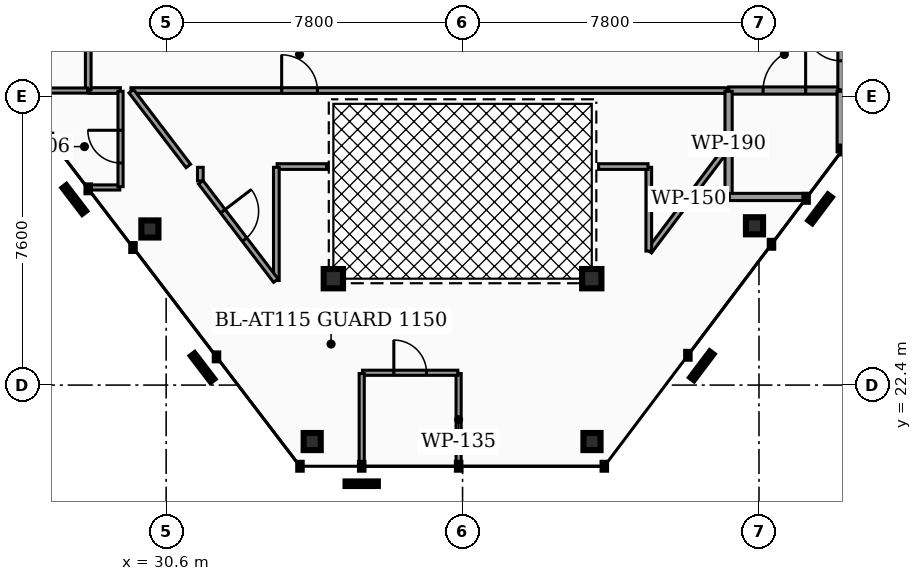
"""IFC4 building model, lengths in metres.
Left out: names, types, materials, properties, quantities, classifications, styles, units other than length and angle.
Written with IfcOpenShell. Run it as: python <this file> out.ifc"""

import sys

from ifc_helpers import new_model, si_unit, direction, frame, frame_2d, origin, origin_2d, place, context, subcontext, project, spatial, rectangle, hollow_rectangle, hollow_circle, extrude, element, fill, save


model = new_model("IFC4")
c1 = context("Model", 3, precision=1e-05, world=origin(), true_north=direction((0.0, 1.0)))
c2 = subcontext(c1, "Body", "Model", "MODEL_VIEW")
j1 = project(units=[si_unit("LENGTHUNIT", "METRE"), si_unit("PLANEANGLEUNIT", "RADIAN")], contexts=[c1])
p1 = place(None, origin())
s1 = spatial("IfcSite", under=j1, at=p1, CompositionType="ELEMENT")
p2 = place(p1, origin())
s2 = spatial("IfcBuilding", under=s1, at=p2, CompositionType="ELEMENT")
p3 = place(p2, frame((0.0, 0.0, 295.8)))
s3 = spatial("IfcBuildingStorey", under=s2, at=p3, CompositionType="ELEMENT", Elevation=295.8)
p4 = place(p3, frame((30.173, 26.508, 0.0), z_axis=(0.066891384466, 0.132340162457, 0.988944702238), x_axis=(-0.892473001286, 0.451100811321, 0.0)))
e1 = element("IfcColumn", 1, at=p4, inside=s3, PredefinedType="COLUMN", context=c2, shape_type="SweptSolid", body=[
    extrude(hollow_rectangle(XDim=0.45, YDim=0.45, WallThickness=0.022, at=origin_2d()), origin(), (0.0, 0.0, 1.0), 3.216),
])
p5 = place(p3, frame((34.443, 20.914, 0.0), z_axis=(0.062642789839, 0.142576809804, 0.987799440265), x_axis=(-0.915530323454, 0.402248961262, 0.0)))
e2 = element("IfcColumn", 2, at=p5, inside=s3, PredefinedType="COLUMN", context=c2, shape_type="SweptSolid", body=[
    extrude(hollow_rectangle(XDim=0.45, YDim=0.45, WallThickness=0.022, at=origin_2d()), origin(), (0.0, 0.0, 1.0), 3.219),
])
p6 = place(p3, frame((41.806, 20.914, 0.0), z_axis=(-0.118089079314, 0.141857807738, 0.98281805627), x_axis=(-0.768556261675, -0.639782207192, 0.0)))
e3 = element("IfcColumn", 3, at=p6, inside=s3, PredefinedType="COLUMN", context=c2, shape_type="SweptSolid", body=[
    extrude(hollow_rectangle(XDim=0.45, YDim=0.45, WallThickness=0.022, at=origin_2d()), origin(), (0.0, 0.0, 1.0), 3.236),
])
p7 = place(p3, frame((46.082, 26.592, 0.0), z_axis=(-0.130108825885, 0.129656010946, 0.982985764013), x_axis=(-0.705873099589, -0.708338314139, 0.0)))
e4 = element("IfcColumn", 4, at=p7, inside=s3, PredefinedType="COLUMN", context=c2, shape_type="SweptSolid", body=[
    extrude(hollow_rectangle(XDim=0.45, YDim=0.45, WallThickness=0.022, at=origin_2d()), origin(), (0.0, 0.0, 1.0), 3.235),
])
for number, where, z_axis, x_axis in (
    (5, (35.0, 25.2, 0.0), (0.0, 0.0, 1.0), (1.0, 0.0, 0.0)),
    (6, (41.8, 25.2, 0.0), (0.0, 0.0, 1.0), (1.0, 0.0, 0.0)),
):
    element("IfcColumn", number, at=place(p3, frame(where, z_axis=z_axis, x_axis=x_axis)), inside=s3, PredefinedType="COLUMN", context=c2, shape_type="SweptSolid", body=[
        extrude(hollow_circle(Radius=0.254, WallThickness=0.02, at=origin_2d()), origin(), (0.0, 0.0, 1.0), 3.18),
    ])
p8 = place(p3, frame((45.405, 30.15, 0.0), z_axis=(0.0, 0.0, 1.0), x_axis=(1.0, 0.0, 0.0)))
e7 = element("IfcWall", 7, at=p8, inside=s3, PredefinedType="PARTITIONING", context=c2, shape_type="SweptSolid", body=[
    extrude(rectangle(XDim=2.925, YDim=0.19, at=frame_2d((1.462, 0.0))), origin(), (0.0, 0.0, 1.0), 2.235),
])
p9 = place(p8, frame((0.903, 0.0, 0.0)))
e8 = element("IfcOpeningElement", 8, at=p9, cuts=e7, PredefinedType="OPENING", context=c2, shape_type="SweptSolid", body=[
    extrude(rectangle(XDim=1.12, YDim=2.05, at=frame_2d((0.56, 1.025))), frame((0.0, 0.105, 0.0), z_axis=(0.0, -1.0, 0.0), x_axis=(1.0, 0.0, 0.0)), (0.0, 0.0, 1.0), 0.21),
])
p10 = place(p3, frame((29.675, 30.15, 0.0), z_axis=(0.0, 0.0, 1.0), x_axis=(1.0, 0.0, 0.0)))
e9 = element("IfcWall", 9, at=p10, inside=s3, PredefinedType="PARTITIONING", context=c2, shape_type="SweptSolid", body=[
    extrude(rectangle(XDim=15.67, YDim=0.15, at=frame_2d((7.835, 0.0))), origin(), (0.0, 0.0, 1.0), 2.235),
])
p11 = place(p10, frame((3.965, 0.0, 0.0)))
e10 = element("IfcOpeningElement", 10, at=p11, cuts=e9, PredefinedType="OPENING", context=c2, shape_type="SweptSolid", body=[
    extrude(rectangle(XDim=0.94, YDim=2.05, at=frame_2d((0.47, 1.025))), frame((0.0, 0.085, 0.0), z_axis=(0.0, -1.0, 0.0), x_axis=(1.0, 0.0, 0.0)), (0.0, 0.0, 1.0), 0.17),
])
p12 = place(p3, frame((28.57, 30.15, 0.0), z_axis=(0.0, 0.0, 1.0), x_axis=(1.0, 0.0, 0.0)))
e11 = element("IfcWall", 11, at=p12, inside=s3, PredefinedType="PARTITIONING", context=c2, shape_type="SweptSolid", body=[
    extrude(rectangle(XDim=0.825, YDim=0.15, at=frame_2d((0.413, 0.0))), origin(), (0.0, 0.0, 1.0), 2.235),
])
p13 = place(p3, frame((28.55, 30.17, 0.0), z_axis=(0.0, 0.0, 1.0), x_axis=(0.0, 1.0, 0.0)))
e12 = element("IfcWall", 12, at=p13, inside=s3, PredefinedType="PARTITIONING", context=c2, shape_type="SweptSolid", body=[
    extrude(rectangle(XDim=1.471, YDim=0.15, at=frame_2d((0.736, 0.0))), origin(), (0.0, 0.0, 1.0), 2.235),
])
p14 = place(p3, frame((48.35, 30.17, 0.0), z_axis=(0.0, 0.0, 1.0), x_axis=(0.0, 1.0, 0.0)))
e13 = element("IfcWall", 13, at=p14, inside=s3, PredefinedType="PARTITIONING", context=c2, shape_type="SweptSolid", body=[
    extrude(rectangle(XDim=2.465, YDim=0.15, at=frame_2d((1.233, 0.0))), origin(), (0.0, 0.0, 1.0), 2.235),
])
p15 = place(p14, frame((0.763, 0.0, 0.0)))
e14 = element("IfcOpeningElement", 14, at=p15, cuts=e13, PredefinedType="OPENING", context=c2, shape_type="SweptSolid", body=[
    extrude(rectangle(XDim=0.94, YDim=2.05, at=frame_2d((0.47, 1.025))), frame((0.0, 0.085, 0.0), z_axis=(0.0, -1.0, 0.0), x_axis=(1.0, 0.0, 0.0)), (0.0, 0.0, 1.0), 0.17),
])
p16 = place(p3, frame((45.4, 27.37, 0.0), z_axis=(0.0, 0.0, 1.0), x_axis=(0.0, 1.0, 0.0)))
e15 = element("IfcWall", 15, at=p16, inside=s3, PredefinedType="PARTITIONING", context=c2, shape_type="SweptSolid", body=[
    extrude(rectangle(XDim=2.76, YDim=0.19, at=frame_2d((1.38, 0.0))), origin(), (0.0, 0.0, 1.0), 2.235),
])
p17 = place(p3, frame((45.42, 27.35, 0.0), z_axis=(0.0, 0.0, 1.0), x_axis=(1.0, 0.0, 0.0)))
e16 = element("IfcWall", 16, at=p17, inside=s3, PredefinedType="PARTITIONING", context=c2, shape_type="SweptSolid", body=[
    extrude(rectangle(XDim=2.032, YDim=0.19, at=frame_2d((1.016, 0.0))), origin(), (0.0, 0.0, 1.0), 2.235),
])
p18 = place(p3, frame((48.35, 28.537, 0.0), z_axis=(0.0, 0.0, 1.0), x_axis=(0.0, 1.0, 0.0)))
e17 = element("IfcWall", 17, at=p18, inside=s3, PredefinedType="PARTITIONING", context=c2, shape_type="SweptSolid", body=[
    extrude(rectangle(XDim=1.593, YDim=0.19, at=frame_2d((0.797, 0.0))), origin(), (0.0, 0.0, 1.0), 2.235),
])
p19 = place(p3, frame((43.312, 25.922, 0.0), z_axis=(0.0, 0.0, 1.0), x_axis=(0.60171699977, 0.798709366533, 0.0)))
e18 = element("IfcWall", 18, at=p19, inside=s3, PredefinedType="PARTITIONING", context=c2, shape_type="SweptSolid", body=[
    extrude(rectangle(XDim=3.455, YDim=0.15, at=frame_2d((1.728, 0.0))), origin(), (0.0, 0.0, 1.0), 2.235),
])
p20 = place(p3, frame((43.3, 25.926, 0.0), z_axis=(0.0, 0.0, 1.0), x_axis=(0.0, 1.0, 0.0)))
e19 = element("IfcWall", 19, at=p20, inside=s3, PredefinedType="PARTITIONING", context=c2, shape_type="SweptSolid", body=[
    extrude(rectangle(XDim=2.204, YDim=0.15, at=frame_2d((1.102, 0.0))), origin(), (0.0, 0.0, 1.0), 2.235),
])
for number, where, z_axis, x_axis in (
    (20, (41.98, 28.15, 0.0), (0.0, 0.0, 1.0), (1.0, 0.0, 0.0)),
    (21, (33.52, 28.15, 0.0), (0.0, 0.0, 1.0), (1.0, 0.0, 0.0)),
):
    element("IfcWall", number, at=place(p3, frame(where, z_axis=z_axis, x_axis=x_axis)), inside=s3, PredefinedType="PARTITIONING", context=c2, shape_type="SweptSolid", body=[
        extrude(rectangle(XDim=1.3, YDim=0.15, at=frame_2d((0.65, 0.0))), origin(), (0.0, 0.0, 1.0), 2.235),
    ])
p21 = place(p3, frame((33.5, 25.153, 0.0), z_axis=(0.0, 0.0, 1.0), x_axis=(0.0, 1.0, 0.0)))
e22 = element("IfcWall", 22, at=p21, inside=s3, PredefinedType="PARTITIONING", context=c2, shape_type="SweptSolid", body=[
    extrude(rectangle(XDim=2.977, YDim=0.15, at=frame_2d((1.489, 0.0))), origin(), (0.0, 0.0, 1.0), 2.235),
])
p22 = place(p3, frame((31.512, 27.736, 0.0), z_axis=(0.0, 0.0, 1.0), x_axis=(0.606793028784, -0.794859874581, 0.0)))
e23 = element("IfcWall", 23, at=p22, inside=s3, PredefinedType="PARTITIONING", context=c2, shape_type="SweptSolid", body=[
    extrude(rectangle(XDim=3.256, YDim=0.15, at=frame_2d((1.628, 0.0))), origin(), (0.0, 0.0, 1.0), 2.235),
])
p23 = place(p22, frame((0.958, 0.0, 0.0)))
e24 = element("IfcOpeningElement", 24, at=p23, cuts=e23, PredefinedType="OPENING", context=c2, shape_type="SweptSolid", body=[
    extrude(rectangle(XDim=0.94, YDim=2.05, at=frame_2d((0.47, 1.025))), frame((0.0, 0.085, 0.0), z_axis=(0.0, -1.0, 0.0), x_axis=(1.0, 0.0, 0.0)), (0.0, 0.0, 1.0), 0.17),
])
p24 = place(p3, frame((31.5, 27.772, 0.0), z_axis=(0.0, 0.0, 1.0), x_axis=(0.0, 1.0, 0.0)))
e25 = element("IfcWall", 25, at=p24, inside=s3, PredefinedType="PARTITIONING", context=c2, shape_type="SweptSolid", body=[
    extrude(rectangle(XDim=0.358, YDim=0.15, at=frame_2d((0.179, 0.0))), origin(), (0.0, 0.0, 1.0), 2.235),
])
p25 = place(p3, frame((29.682, 30.134, 0.0), z_axis=(0.0, 0.0, 1.0), x_axis=(0.60687170499, -0.794799807299, 0.0)))
e26 = element("IfcWall", 26, at=p25, inside=s3, PredefinedType="PARTITIONING", context=c2, shape_type="SweptSolid", body=[
    extrude(rectangle(XDim=2.476, YDim=0.15, at=frame_2d((1.238, 0.0))), origin(), (0.0, 0.0, 1.0), 2.235),
])
p26 = place(p3, frame((28.536, 27.6, 0.0), z_axis=(0.0, 0.0, 1.0), x_axis=(1.0, 0.0, 0.0)))
e27 = element("IfcWall", 27, at=p26, inside=s3, PredefinedType="PARTITIONING", context=c2, shape_type="SweptSolid", body=[
    extrude(rectangle(XDim=0.844, YDim=0.135, at=frame_2d((0.422, 0.0))), origin(), (0.0, 0.0, 1.0), 2.235),
])
p27 = place(p3, frame((29.4, 27.62, 0.0), z_axis=(0.0, 0.0, 1.0), x_axis=(0.0, 1.0, 0.0)))
e28 = element("IfcWall", 28, at=p27, inside=s3, PredefinedType="PARTITIONING", context=c2, shape_type="SweptSolid", body=[
    extrude(rectangle(XDim=2.51, YDim=0.135, at=frame_2d((1.255, 0.0))), origin(), (0.0, 0.0, 1.0), 2.235),
])
p28 = place(p27, frame((0.625, 0.0, 0.0)))
e29 = element("IfcOpeningElement", 29, at=p28, cuts=e28, PredefinedType="OPENING", context=c2, shape_type="SweptSolid", body=[
    extrude(rectangle(XDim=0.86, YDim=2.05, at=frame_2d((0.43, 1.025))), frame((0.0, 0.077, 0.0), z_axis=(0.0, -1.0, 0.0), x_axis=(1.0, 0.0, 0.0)), (0.0, 0.0, 1.0), 0.155),
])
p29 = place(p3, frame((38.296, 20.279, 0.0), z_axis=(0.0, 0.0, 1.0), x_axis=(0.0, 1.0, 0.0)))
e30 = element("IfcWall", 30, at=p29, inside=s3, PredefinedType="PARTITIONING", context=c2, shape_type="SweptSolid", body=[
    extrude(rectangle(XDim=2.425, YDim=0.135, at=frame_2d((1.212, 0.0))), origin(), (0.0, 0.0, 1.0), 2.235),
])
p30 = place(p3, frame((35.766, 22.724, 0.0), z_axis=(0.0, 0.0, 1.0), x_axis=(1.0, 0.0, 0.0)))
e31 = element("IfcWall", 31, at=p30, inside=s3, PredefinedType="PARTITIONING", context=c2, shape_type="SweptSolid", body=[
    extrude(rectangle(XDim=2.51, YDim=0.135, at=frame_2d((1.255, 0.0))), origin(), (0.0, 0.0, 1.0), 2.235),
])
p31 = place(p30, frame((0.825, 0.0, 0.0)))
e32 = element("IfcOpeningElement", 32, at=p31, cuts=e31, PredefinedType="OPENING", context=c2, shape_type="SweptSolid", body=[
    extrude(rectangle(XDim=0.86, YDim=2.05, at=frame_2d((0.43, 1.025))), frame((0.0, 0.077, 0.0), z_axis=(0.0, -1.0, 0.0), x_axis=(1.0, 0.0, 0.0)), (0.0, 0.0, 1.0), 0.155),
])
p32 = place(p3, frame((35.746, 20.279, 0.0), z_axis=(0.0, 0.0, 1.0), x_axis=(0.0, 1.0, 0.0)))
e33 = element("IfcWall", 33, at=p32, inside=s3, PredefinedType="PARTITIONING", context=c2, shape_type="SweptSolid", body=[
    extrude(rectangle(XDim=2.425, YDim=0.135, at=frame_2d((1.212, 0.0))), origin(), (0.0, 0.0, 1.0), 2.235),
])
p33 = place(p3, frame((26.59, 30.15, 0.0), z_axis=(0.0, 0.0, 1.0), x_axis=(1.0, 0.0, 0.0)))
e34 = element("IfcWall", 34, at=p33, inside=s3, PredefinedType="PARTITIONING", context=c2, shape_type="SweptSolid", body=[
    extrude(rectangle(XDim=1.94, YDim=0.135, at=frame_2d((0.97, 0.0))), origin(), (0.0, 0.0, 1.0), 2.235),
])
p34 = place(p9, origin())
e35 = element("IfcDoor", 35, at=p34, inside=s3, OperationType="SINGLE_SWING_RIGHT", PredefinedType="DOOR", context=c2, shape_type="SweptSolid", body=[
    extrude(rectangle(XDim=1.12, YDim=2.05, at=frame_2d((0.56, 1.025))), frame((0.0, 0.025, 0.0), z_axis=(0.0, -1.0, 0.0), x_axis=(1.0, 0.0, 0.0)), (0.0, 0.0, 1.0), 0.05),
])
fill(e8, e35)
p35 = place(p11, origin())
e36 = element("IfcDoor", 36, at=p35, inside=s3, OperationType="SINGLE_SWING_LEFT", PredefinedType="DOOR", context=c2, shape_type="SweptSolid", body=[
    extrude(rectangle(XDim=0.94, YDim=2.05, at=frame_2d((0.47, 1.025))), frame((0.0, 0.025, 0.0), z_axis=(0.0, -1.0, 0.0), x_axis=(1.0, 0.0, 0.0)), (0.0, 0.0, 1.0), 0.05),
])
fill(e10, e36)
p36 = place(p15, origin())
e37 = element("IfcDoor", 37, at=p36, inside=s3, OperationType="SINGLE_SWING_RIGHT", PredefinedType="DOOR", context=c2, shape_type="SweptSolid", body=[
    extrude(rectangle(XDim=0.94, YDim=2.05, at=frame_2d((0.47, 1.025))), frame((0.0, 0.025, 0.0), z_axis=(0.0, -1.0, 0.0), x_axis=(1.0, 0.0, 0.0)), (0.0, 0.0, 1.0), 0.05),
])
fill(e14, e37)
p37 = place(p23, origin())
e38 = element("IfcDoor", 38, at=p37, inside=s3, OperationType="SINGLE_SWING_LEFT", PredefinedType="DOOR", context=c2, shape_type="SweptSolid", body=[
    extrude(rectangle(XDim=0.94, YDim=2.05, at=frame_2d((0.47, 1.025))), frame((0.0, 0.025, 0.0), z_axis=(0.0, -1.0, 0.0), x_axis=(1.0, 0.0, 0.0)), (0.0, 0.0, 1.0), 0.05),
])
fill(e24, e38)
p38 = place(p28, origin())
e39 = element("IfcDoor", 39, at=p38, inside=s3, OperationType="SINGLE_SWING_RIGHT", PredefinedType="DOOR", context=c2, shape_type="SweptSolid", body=[
    extrude(rectangle(XDim=0.86, YDim=2.05, at=frame_2d((0.43, 1.025))), frame((0.0, 0.025, 0.0), z_axis=(0.0, -1.0, 0.0), x_axis=(1.0, 0.0, 0.0)), (0.0, 0.0, 1.0), 0.05),
])
fill(e29, e39)
p39 = place(p31, origin())
e40 = element("IfcDoor", 40, at=p39, inside=s3, OperationType="SINGLE_SWING_LEFT", PredefinedType="DOOR", context=c2, shape_type="SweptSolid", body=[
    extrude(rectangle(XDim=0.86, YDim=2.05, at=frame_2d((0.43, 1.025))), frame((0.0, 0.025, 0.0), z_axis=(0.0, -1.0, 0.0), x_axis=(1.0, 0.0, 0.0)), (0.0, 0.0, 1.0), 0.05),
])
fill(e32, e40)
save(model, sys.argv[1])
